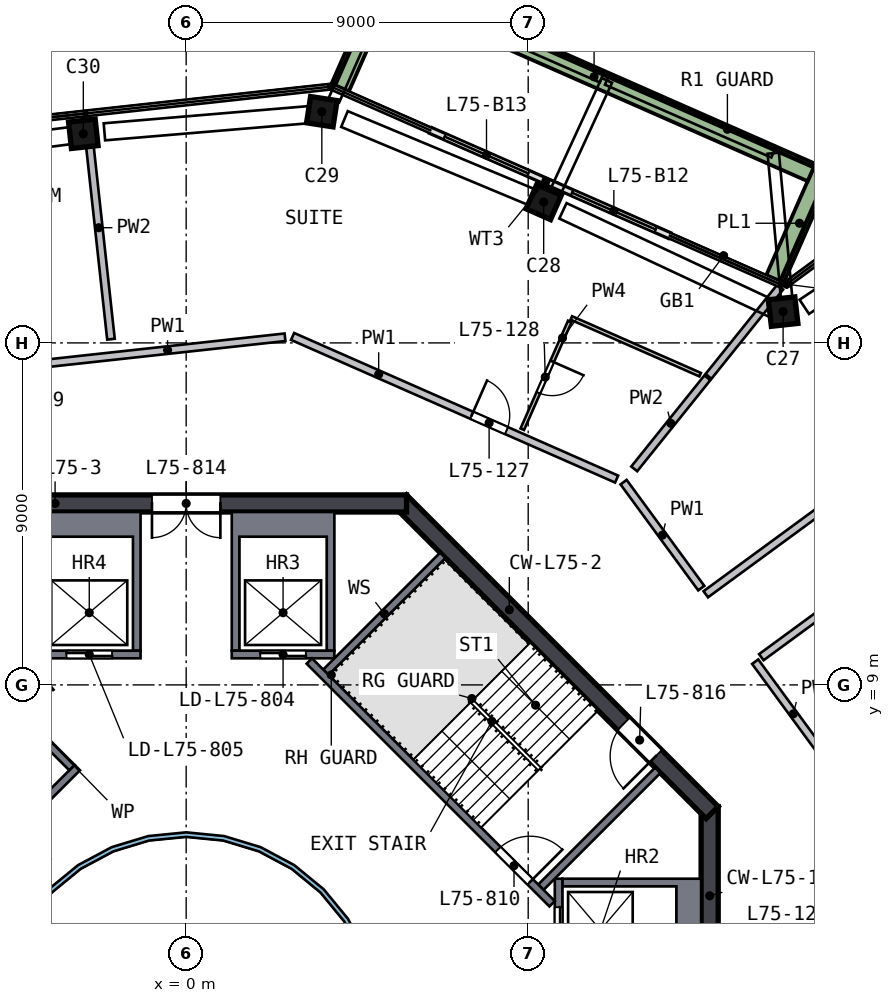
"""IFC4 building model, lengths in metres.
Left out: names, types, materials, properties, quantities, classifications, styles, units other than length and angle.
Written with IfcOpenShell. Run it as: python <this file> out.ifc"""

import sys

from ifc_helpers import new_model, si_unit, direction, frame, frame_2d, origin, origin_2d, place, context, subcontext, project, spatial, polyline, rectangle, outline, extrude, element, fill, save


model = new_model("IFC4")
c1 = context("Model", 3, precision=1e-05, world=origin(), true_north=direction((0.0, 1.0)))
c2 = subcontext(c1, "Body", "Model", "MODEL_VIEW")
j1 = project(units=[si_unit("LENGTHUNIT", "METRE"), si_unit("PLANEANGLEUNIT", "RADIAN")], contexts=[c1])
p1 = place(None, origin())
s1 = spatial("IfcSite", under=j1, at=p1, CompositionType="ELEMENT")
p2 = place(p1, origin())
s2 = spatial("IfcBuilding", under=s1, at=p2, CompositionType="ELEMENT")
p3 = place(p2, frame((0.0, 0.0, 303.0)))
s3 = spatial("IfcBuildingStorey", under=s2, at=p3, CompositionType="ELEMENT", Elevation=303.0)
p4 = place(p3, frame((15.816, 18.734, 0.0), z_axis=(-0.089770684, 0.074416173, 0.993178462), x_axis=(0.989989949, 0.115711882, 0.080812506)))
e1 = element("IfcColumn", 1, at=p4, inside=s3, PredefinedType="COLUMN", context=c2, shape_type="SweptSolid", body=[
    extrude(rectangle(XDim=0.7, YDim=0.7, at=origin_2d()), origin(), (0.0, 0.0, 1.0), 3.212),
])
p5 = place(p3, frame((9.532, 21.653, 0.0), z_axis=(-0.103349904, 0.044488369, 0.993649628), x_axis=(-0.909315502, 0.400606791, -0.112514522)))
e2 = element("IfcColumn", 2, at=p5, inside=s3, PredefinedType="COLUMN", context=c2, shape_type="SweptSolid", body=[
    extrude(rectangle(XDim=0.7, YDim=0.7, at=origin_2d()), origin(), (0.0, 0.0, 1.0), 3.21),
])
p6 = place(p3, frame((3.708, 24.064, 0.0), z_axis=(-0.114562055, 0.016648368, 0.993276582), x_axis=(0.981703846, -0.151184916, 0.115761304)))
e3 = element("IfcColumn", 3, at=p6, inside=s3, PredefinedType="COLUMN", context=c2, shape_type="SweptSolid", body=[
    extrude(rectangle(XDim=0.7, YDim=0.7, at=origin_2d()), origin(), (0.0, 0.0, 1.0), 3.211),
])
p7 = place(p3, frame((-2.572, 23.518, 0.0), z_axis=(-0.111790618, -0.013232359, 0.99364368), x_axis=(-0.987711126, -0.108422299, -0.112567032)))
e4 = element("IfcColumn", 4, at=p7, inside=s3, PredefinedType="COLUMN", context=c2, shape_type="SweptSolid", body=[
    extrude(rectangle(XDim=0.7, YDim=0.7, at=origin_2d()), origin(), (0.0, 0.0, 1.0), 3.21),
])
p8 = place(p3, frame((13.775, -5.799, 0.0), z_axis=(0.0, 0.0, 1.0), x_axis=(0.0, 1.0, 0.0)))
e5 = element("IfcWall", 5, at=p8, inside=s3, PredefinedType="SHEAR", context=c2, shape_type="SweptSolid", body=[
    extrude(rectangle(XDim=11.598, YDim=0.45, at=frame_2d((5.799, 0.0))), origin(), (0.0, 0.0, 1.0), 3.5),
])
p9 = place(p8, frame((4.899, 0.0, 0.0)))
e6 = element("IfcOpeningElement", 6, at=p9, cuts=e5, PredefinedType="OPENING", context=c2, shape_type="SweptSolid", body=[
    extrude(rectangle(XDim=1.8, YDim=2.1, at=frame_2d((0.9, 1.05))), frame((0.0, 0.235, 0.0), z_axis=(0.0, -1.0, 0.0), x_axis=(1.0, 0.0, 0.0)), (0.0, 0.0, 1.0), 0.47),
])
p10 = place(p3, frame((13.841, 5.64, 0.0), z_axis=(0.0, 0.0, 1.0), x_axis=(-0.707106781, 0.707106781, 0.0)))
e7 = element("IfcWall", 7, at=p10, inside=s3, PredefinedType="SHEAR", context=c2, shape_type="SweptSolid", body=[
    extrude(rectangle(XDim=11.598, YDim=0.45, at=frame_2d((5.799, 0.0))), origin(), (0.0, 0.0, 1.0), 3.5),
])
p11 = place(p10, frame((2.099, 0.0, 0.0)))
e8 = element("IfcOpeningElement", 8, at=p11, cuts=e7, PredefinedType="OPENING", context=c2, shape_type="SweptSolid", body=[
    extrude(rectangle(XDim=1.2, YDim=2.1, at=frame_2d((0.6, 1.05))), frame((0.0, 0.235, 0.0), z_axis=(0.0, -1.0, 0.0), x_axis=(1.0, 0.0, 0.0)), (0.0, 0.0, 1.0), 0.47),
])
p12 = place(p3, frame((5.799, 13.775, 0.0), z_axis=(0.0, 0.0, 1.0), x_axis=(-1.0, 0.0, 0.0)))
e9 = element("IfcWall", 9, at=p12, inside=s3, PredefinedType="SHEAR", context=c2, shape_type="SweptSolid", body=[
    extrude(rectangle(XDim=11.598, YDim=0.45, at=frame_2d((5.799, 0.0))), origin(), (0.0, 0.0, 1.0), 3.5),
])
p13 = place(p12, frame((4.899, 0.0, 0.0)))
e10 = element("IfcOpeningElement", 10, at=p13, cuts=e9, PredefinedType="OPENING", context=c2, shape_type="SweptSolid", body=[
    extrude(rectangle(XDim=1.8, YDim=2.1, at=frame_2d((0.9, 1.05))), frame((0.0, 0.235, 0.0), z_axis=(0.0, -1.0, 0.0), x_axis=(1.0, 0.0, 0.0)), (0.0, 0.0, 1.0), 0.47),
])
p14 = place(p3, frame((12.718, 20.824, 0.0), z_axis=(0.0, 0.0, 1.0), x_axis=(-0.915258533, 0.402866999, 0.0)))
e11 = element("IfcWall", 11, at=p14, inside=s3, PredefinedType="SOLIDWALL", context=c2, shape_type="SweptSolid", body=[
    extrude(rectangle(XDim=3.25, YDim=0.15, at=frame_2d((1.625, 0.0))), origin(), (0.0, 0.0, 1.0), 2.525),
])
p15 = place(p14, frame((0.4, 0.0, 0.0)))
e12 = element("IfcOpeningElement", 12, at=p15, cuts=e11, PredefinedType="OPENING", context=c2, shape_type="SweptSolid", body=[
    extrude(rectangle(XDim=2.4, YDim=2.4, at=frame_2d((1.2, 1.2))), frame((0.0, 0.085, 0.0), z_axis=(0.0, -1.0, 0.0), x_axis=(1.0, 0.0, 0.0)), (0.0, 0.0, 1.0), 0.17),
])
p16 = place(p3, frame((9.744, 22.134, 0.0), z_axis=(0.0, 0.0, 1.0), x_axis=(-0.915233272, 0.402924383, 0.0)))
e13 = element("IfcWall", 13, at=p16, inside=s3, PredefinedType="SOLIDWALL", context=c2, shape_type="SweptSolid", body=[
    extrude(rectangle(XDim=3.611, YDim=0.15, at=frame_2d((1.806, 0.0))), origin(), (0.0, 0.0, 1.0), 2.525),
])
p17 = place(p16, frame((0.811, 0.0, 0.0)))
e14 = element("IfcOpeningElement", 14, at=p17, cuts=e13, PredefinedType="OPENING", context=c2, shape_type="SweptSolid", body=[
    extrude(rectangle(XDim=2.4, YDim=2.4, at=frame_2d((1.2, 1.2))), frame((0.0, 0.085, 0.0), z_axis=(0.0, -1.0, 0.0), x_axis=(1.0, 0.0, 0.0)), (0.0, 0.0, 1.0), 0.17),
])
p18 = place(p3, frame((15.494, 19.685, 0.0), z_axis=(0.0, 0.0, 1.0), x_axis=(0.402963671, 0.915215974, 0.0)))
e15 = element("IfcWall", 15, at=p18, inside=s3, PredefinedType="SOLIDWALL", context=c2, shape_type="SweptSolid", body=[
    extrude(rectangle(XDim=3.199, YDim=0.5, at=frame_2d((1.6, 0.0))), origin(), (0.0, 0.0, 1.0), 0.7),
])
p19 = place(p3, frame((16.454, 22.485, 0.0), z_axis=(0.0, 0.0, 1.0), x_axis=(-0.915245899, 0.402895698, 0.0)))
e16 = element("IfcWall", 16, at=p19, inside=s3, PredefinedType="SOLIDWALL", context=c2, shape_type="SweptSolid", body=[
    extrude(rectangle(XDim=12.5, YDim=0.5, at=frame_2d((6.25, 0.0))), origin(), (0.0, 0.0, 1.0), 0.7),
])
p20 = place(p3, frame((5.141, 27.192, 0.0), z_axis=(0.0, 0.0, 1.0), x_axis=(-0.402862888, -0.915260342, 0.0)))
e17 = element("IfcWall", 17, at=p20, inside=s3, PredefinedType="SOLIDWALL", context=c2, shape_type="SweptSolid", body=[
    extrude(rectangle(XDim=2.699, YDim=0.5, at=frame_2d((1.35, 0.0))), origin(), (0.0, 0.0, 1.0), 0.7),
])
p21 = place(p3, origin())
e18 = element("IfcWall", 18, at=p21, inside=s3, PredefinedType="SOLIDWALL", context=c2, shape_type="SweptSolid", body=[
    extrude(outline(polyline([(13.55, 3.9), (13.55, 1.2), (9.9, 1.2), (9.9, 1.4), (12.9, 1.4), (12.9, 3.7), (9.9, 3.7), (9.9, 3.9), (13.55, 3.9)])), origin(), (0.0, 0.0, 1.0), 3.19),
])
p22 = place(p3, frame((9.8, 1.2, 0.0), z_axis=(0.0, 0.0, 1.0), x_axis=(0.0, 1.0, 0.0)))
e19 = element("IfcWall", 19, at=p22, inside=s3, PredefinedType="SOLIDWALL", context=c2, shape_type="SweptSolid", body=[
    extrude(rectangle(XDim=2.7, YDim=0.2, at=frame_2d((1.35, 0.0))), origin(), (0.0, 0.0, 1.0), 3.19),
])
p23 = place(p22, frame((0.75, 0.0, 0.0)))
e20 = element("IfcOpeningElement", 20, at=p23, cuts=e19, PredefinedType="OPENING", context=c2, shape_type="SweptSolid", body=[
    extrude(rectangle(XDim=1.2, YDim=2.1, at=frame_2d((0.6, 1.05))), frame((0.0, 0.11, 0.0), z_axis=(0.0, -1.0, 0.0), x_axis=(1.0, 0.0, 0.0)), (0.0, 0.0, 1.0), 0.22),
])
p24 = place(p3, origin())
e21 = element("IfcWall", 21, at=p24, inside=s3, PredefinedType="SOLIDWALL", context=c2, shape_type="SweptSolid", body=[
    extrude(outline(polyline([(3.9, 9.9), (3.7, 9.9), (3.7, 12.9), (1.4, 12.9), (1.4, 9.9), (1.2, 9.9), (1.2, 13.55), (3.9, 13.55), (3.9, 9.9)])), origin(), (0.0, 0.0, 1.0), 3.19),
])
p25 = place(p3, frame((1.2, 9.8, 0.0), z_axis=(0.0, 0.0, 1.0), x_axis=(1.0, 0.0, 0.0)))
e22 = element("IfcWall", 22, at=p25, inside=s3, PredefinedType="SOLIDWALL", context=c2, shape_type="SweptSolid", body=[
    extrude(rectangle(XDim=2.7, YDim=0.2, at=frame_2d((1.35, 0.0))), origin(), (0.0, 0.0, 1.0), 3.19),
])
p26 = place(p25, frame((0.75, 0.0, 0.0)))
e23 = element("IfcOpeningElement", 23, at=p26, cuts=e22, PredefinedType="OPENING", context=c2, shape_type="SweptSolid", body=[
    extrude(rectangle(XDim=1.2, YDim=2.1, at=frame_2d((0.6, 1.05))), frame((0.0, 0.11, 0.0), z_axis=(0.0, -1.0, 0.0), x_axis=(1.0, 0.0, 0.0)), (0.0, 0.0, 1.0), 0.22),
])
p27 = place(p3, origin())
e24 = element("IfcWall", 24, at=p27, inside=s3, PredefinedType="SOLIDWALL", context=c2, shape_type="SweptSolid", body=[
    extrude(outline(polyline([(-3.9, 13.55), (-1.2, 13.55), (-1.2, 9.9), (-1.4, 9.9), (-1.4, 12.9), (-3.7, 12.9), (-3.7, 9.9), (-3.9, 9.9), (-3.9, 13.55)])), origin(), (0.0, 0.0, 1.0), 3.19),
])
p28 = place(p3, frame((-1.2, 9.8, 0.0), z_axis=(0.0, 0.0, 1.0), x_axis=(-1.0, 0.0, 0.0)))
e25 = element("IfcWall", 25, at=p28, inside=s3, PredefinedType="SOLIDWALL", context=c2, shape_type="SweptSolid", body=[
    extrude(rectangle(XDim=2.7, YDim=0.2, at=frame_2d((1.35, 0.0))), origin(), (0.0, 0.0, 1.0), 3.19),
])
p29 = place(p28, frame((0.75, 0.0, 0.0)))
e26 = element("IfcOpeningElement", 26, at=p29, cuts=e25, PredefinedType="OPENING", context=c2, shape_type="SweptSolid", body=[
    extrude(rectangle(XDim=1.2, YDim=2.1, at=frame_2d((0.6, 1.05))), frame((0.0, 0.11, 0.0), z_axis=(0.0, -1.0, 0.0), x_axis=(1.0, 0.0, 0.0)), (0.0, 0.0, 1.0), 0.22),
])
p30 = place(p3, frame((3.24, 9.629, 0.0), z_axis=(0.0, 0.0, 1.0), x_axis=(0.707106781, -0.707106781, 0.0)))
e27 = element("IfcWall", 27, at=p30, inside=s3, PredefinedType="SOLIDWALL", context=c2, shape_type="SweptSolid", body=[
    extrude(rectangle(XDim=9.036, YDim=0.2, at=frame_2d((4.518, 0.0))), origin(), (0.0, 0.0, 1.0), 3.19),
])
p31 = place(p30, frame((7.018, 0.0, 0.0)))
e28 = element("IfcOpeningElement", 28, at=p31, cuts=e27, PredefinedType="OPENING", context=c2, shape_type="SweptSolid", body=[
    extrude(rectangle(XDim=1.2, YDim=2.1, at=frame_2d((0.6, 1.05))), frame((0.0, 0.11, 0.0), z_axis=(0.0, -1.0, 0.0), x_axis=(1.0, 0.0, 0.0)), (0.0, 0.0, 1.0), 0.22),
])
for number, where, z_axis, x_axis in (
    (29, (9.334, 3.677, 0.0), (0.0, 0.0, 1.0), (0.707, 0.707, 0.0)),
    (30, (3.677, 9.334, 0.0), (0.0, 0.0, 1.0), (0.707, 0.707, 0.0)),
):
    element("IfcWall", number, at=place(p3, frame(where, z_axis=z_axis, x_axis=x_axis)), inside=s3, PredefinedType="SOLIDWALL", context=c2, shape_type="SweptSolid", body=[
        extrude(rectangle(XDim=4.35, YDim=0.2, at=frame_2d((2.175, 0.0))), origin(), (0.0, 0.0, 1.0), 3.19),
    ])
p32 = place(p3, frame((-2.864, 6.823, 0.0), z_axis=(0.0, 0.0, 1.0), x_axis=(-0.707106781, -0.707106781, 0.0)))
e31 = element("IfcWall", 31, at=p32, inside=s3, PredefinedType="SOLIDWALL", context=c2, shape_type="SweptSolid", body=[
    extrude(rectangle(XDim=5.6, YDim=0.2, at=frame_2d((2.8, 0.0))), origin(), (0.0, 0.0, 1.0), 3.19),
])
p33 = place(p32, frame((2.2, 0.0, 0.0)))
e32 = element("IfcOpeningElement", 32, at=p33, cuts=e31, PredefinedType="OPENING", context=c2, shape_type="SweptSolid", body=[
    extrude(rectangle(XDim=1.2, YDim=2.1, at=frame_2d((0.6, 1.05))), frame((0.0, 0.11, 0.0), z_axis=(0.0, -1.0, 0.0), x_axis=(1.0, 0.0, 0.0)), (0.0, 0.0, 1.0), 0.22),
])
p34 = place(p3, frame((-3.005, 6.823, 0.0), z_axis=(0.0, 0.0, 1.0), x_axis=(-0.707106781, 0.707106781, 0.0)))
e33 = element("IfcWall", 33, at=p34, inside=s3, PredefinedType="SOLIDWALL", context=c2, shape_type="SweptSolid", body=[
    extrude(rectangle(XDim=2.8, YDim=0.2, at=frame_2d((1.4, 0.0))), origin(), (0.0, 0.0, 1.0), 3.19),
])
p35 = place(p3, origin())
e34 = element("IfcWall", 34, at=p35, inside=s3, PredefinedType="SOLIDWALL", context=c2, shape_type="SweptSolid", body=[
    extrude(outline(polyline([(5.021, -0.999), (4.73, -1.959), (4.257, -2.844), (3.62, -3.62), (2.844, -4.257), (1.959, -4.73), (0.999, -5.021), (0.0, -5.12), (-0.999, -5.021), (-1.959, -4.73), (-2.844, -4.257), (-3.62, -3.62), (-4.257, -2.844), (-4.73, -1.959), (-5.021, -0.999), (-5.12, 0.0), (-5.021, 0.999), (-4.73, 1.959), (-4.257, 2.844), (-3.62, 3.62), (-2.844, 4.257), (-1.959, 4.73), (-0.999, 5.021), (0.0, 5.12), (0.999, 5.021), (1.959, 4.73), (2.844, 4.257), (3.62, 3.62), (4.257, 2.844), (4.73, 1.959), (5.021, 0.999), (5.12, 0.0), (5.021, -0.999)]), holes=[polyline([(4.904, 0.976), (4.619, 1.913), (4.157, 2.778), (3.535, 3.535), (2.778, 4.157), (1.913, 4.619), (0.976, 4.904), (0.0, 5.0), (-0.976, 4.904), (-1.913, 4.619), (-2.778, 4.157), (-3.535, 3.535), (-4.157, 2.778), (-4.619, 1.913), (-4.904, 0.976), (-5.0, 0.0), (-4.904, -0.976), (-4.619, -1.913), (-4.157, -2.778), (-3.535, -3.535), (-2.778, -4.157), (-1.913, -4.619), (-0.976, -4.904), (0.0, -5.0), (0.976, -4.904), (1.913, -4.619), (2.778, -4.157), (3.535, -3.535), (4.157, -2.778), (4.619, -1.913), (4.904, -0.976), (5.0, 0.0), (4.904, 0.976)])]), origin(), (0.0, 0.0, 1.0), 3.19),
])
p36 = place(p3, frame((-6.66, 17.136, 0.0), z_axis=(0.0, 0.0, 1.0), x_axis=(0.994077134, 0.108676822, 0.0)))
e35 = element("IfcWall", 35, at=p36, inside=s3, PredefinedType="SOLIDWALL", context=c2, shape_type="SweptSolid", body=[
    extrude(rectangle(XDim=9.316, YDim=0.2, at=frame_2d((4.658, 0.0))), origin(), (0.0, 0.0, 1.0), 3.19),
])
p37 = place(p36, frame((1.9, 0.0, 0.0)))
e36 = element("IfcOpeningElement", 36, at=p37, cuts=e35, PredefinedType="OPENING", context=c2, shape_type="SweptSolid", body=[
    extrude(rectangle(XDim=1.0, YDim=2.1, at=frame_2d((0.5, 1.05))), frame((0.0, 0.11, 0.0), z_axis=(0.0, -1.0, 0.0), x_axis=(1.0, 0.0, 0.0)), (0.0, 0.0, 1.0), 0.22),
])
p38 = place(p3, frame((2.8, 18.17, 0.0), z_axis=(0.0, 0.0, 1.0), x_axis=(0.915237733, -0.402914249, 0.0)))
e37 = element("IfcWall", 37, at=p38, inside=s3, PredefinedType="SOLIDWALL", context=c2, shape_type="SweptSolid", body=[
    extrude(rectangle(XDim=9.316, YDim=0.2, at=frame_2d((4.658, 0.0))), origin(), (0.0, 0.0, 1.0), 3.19),
])
p39 = place(p38, frame((5.15, 0.0, 0.0)))
e38 = element("IfcOpeningElement", 38, at=p39, cuts=e37, PredefinedType="OPENING", context=c2, shape_type="SweptSolid", body=[
    extrude(rectangle(XDim=1.0, YDim=2.1, at=frame_2d((0.5, 1.05))), frame((0.0, 0.11, 0.0), z_axis=(0.0, -1.0, 0.0), x_axis=(1.0, 0.0, 0.0)), (0.0, 0.0, 1.0), 0.22),
])
p40 = place(p3, frame((13.554, 11.547, 0.0), z_axis=(0.0, 0.0, 1.0), x_axis=(-0.591164714, 0.806550855, 0.0)))
e39 = element("IfcWall", 39, at=p40, inside=s3, PredefinedType="SOLIDWALL", context=c2, shape_type="SweptSolid", body=[
    extrude(rectangle(XDim=3.458, YDim=0.2, at=frame_2d((1.729, 0.0))), origin(), (0.0, 0.0, 1.0), 3.19),
])
p41 = place(p3, frame((16.983, 6.869, 0.0), z_axis=(0.0, 0.0, 1.0), x_axis=(-0.59115197, 0.806560195, 0.0)))
e40 = element("IfcWall", 40, at=p41, inside=s3, PredefinedType="SOLIDWALL", context=c2, shape_type="SweptSolid", body=[
    extrude(rectangle(XDim=3.4, YDim=0.2, at=frame_2d((1.7, 0.0))), origin(), (0.0, 0.0, 1.0), 3.19),
])
p42 = place(p3, frame((13.673, 11.385, 0.0), z_axis=(0.0, 0.0, 1.0), x_axis=(0.806549823, 0.591166122, 0.0)))
e41 = element("IfcWall", 41, at=p42, inside=s3, PredefinedType="SOLIDWALL", context=c2, shape_type="SweptSolid", body=[
    extrude(rectangle(XDim=19.665, YDim=0.2, at=frame_2d((9.833, 0.0))), origin(), (0.0, 0.0, 1.0), 3.19),
])
p43 = place(p42, frame((15.05, 0.0, 0.0)))
e42 = element("IfcOpeningElement", 42, at=p43, cuts=e41, PredefinedType="OPENING", context=c2, shape_type="SweptSolid", body=[
    extrude(rectangle(XDim=1.0, YDim=2.1, at=frame_2d((0.5, 1.05))), frame((0.0, 0.11, 0.0), z_axis=(0.0, -1.0, 0.0), x_axis=(1.0, 0.0, 0.0)), (0.0, 0.0, 1.0), 0.22),
])
p44 = place(p3, frame((30.834, 21.237, 0.0), z_axis=(0.0, 0.0, 1.0), x_axis=(-0.806546926, -0.591170074, 0.0)))
e43 = element("IfcWall", 43, at=p44, inside=s3, PredefinedType="SOLIDWALL", context=c2, shape_type="SweptSolid", body=[
    extrude(rectangle(XDim=19.465, YDim=0.2, at=frame_2d((9.733, 0.0))), origin(), (0.0, 0.0, 1.0), 3.19),
])
p45 = place(p44, frame((2.1, 0.0, 0.0)))
e44 = element("IfcOpeningElement", 44, at=p45, cuts=e43, PredefinedType="OPENING", context=c2, shape_type="SweptSolid", body=[
    extrude(rectangle(XDim=1.0, YDim=2.1, at=frame_2d((0.5, 1.05))), frame((0.0, 0.11, 0.0), z_axis=(0.0, -1.0, 0.0), x_axis=(1.0, 0.0, 0.0)), (0.0, 0.0, 1.0), 0.22),
])
p46 = place(p3, frame((-1.979, 18.098, 0.0), z_axis=(0.0, 0.0, 1.0), x_axis=(-0.108697214, 0.994074904, 0.0)))
e45 = element("IfcWall", 45, at=p46, inside=s3, PredefinedType="SOLIDWALL", context=c2, shape_type="SweptSolid", body=[
    extrude(rectangle(XDim=5.903, YDim=0.2, at=frame_2d((2.951, 0.0))), origin(), (0.0, 0.0, 1.0), 3.19),
])
p47 = place(p3, frame((11.79, 14.685, 0.0), z_axis=(0.0, 0.0, 1.0), x_axis=(0.626049846, 0.77978304, 0.0)))
e46 = element("IfcWall", 46, at=p47, inside=s3, PredefinedType="SOLIDWALL", context=c2, shape_type="SweptSolid", body=[
    extrude(rectangle(XDim=3.074, YDim=0.2, at=frame_2d((1.537, 0.0))), origin(), (0.0, 0.0, 1.0), 3.19),
])
p48 = place(p3, frame((13.744, 17.118, 0.0), z_axis=(0.0, 0.0, 1.0), x_axis=(0.626058521, 0.779776076, 0.0)))
e47 = element("IfcWall", 47, at=p48, inside=s3, PredefinedType="SOLIDWALL", context=c2, shape_type="SweptSolid", body=[
    extrude(rectangle(XDim=3.011, YDim=0.2, at=frame_2d((1.506, 0.0))), origin(), (0.0, 0.0, 1.0), 3.19),
])
p49 = place(p3, frame((10.094, 18.565, 0.0), z_axis=(0.0, 0.0, 1.0), x_axis=(-0.402920719, -0.915234885, 0.0)))
e48 = element("IfcWall", 48, at=p49, inside=s3, PredefinedType="PARTITIONING", context=c2, shape_type="SweptSolid", body=[
    extrude(rectangle(XDim=3.1, YDim=0.1, at=frame_2d((1.55, 0.0))), origin(), (0.0, 0.0, 1.0), 3.19),
])
p50 = place(p49, frame((1.15, 0.0, 0.0)))
e49 = element("IfcOpeningElement", 49, at=p50, cuts=e48, PredefinedType="OPENING", context=c2, shape_type="SweptSolid", body=[
    extrude(rectangle(XDim=0.9, YDim=2.1, at=frame_2d((0.45, 1.05))), frame((0.0, 0.06, 0.0), z_axis=(0.0, -1.0, 0.0), x_axis=(1.0, 0.0, 0.0)), (0.0, 0.0, 1.0), 0.12),
])
p51 = place(p3, frame((10.134, 18.656, 0.0), z_axis=(0.0, 0.0, 1.0), x_axis=(0.915262542, -0.40285789, 0.0)))
e50 = element("IfcWall", 50, at=p51, inside=s3, PredefinedType="PARTITIONING", context=c2, shape_type="SweptSolid", body=[
    extrude(rectangle(XDim=3.704, YDim=0.1, at=frame_2d((1.852, 0.0))), origin(), (0.0, 0.0, 1.0), 3.19),
])
p52 = place(p15, origin())
e51 = element("IfcDoor", 51, at=p52, inside=s3, OperationType="SLIDING_TO_RIGHT", PredefinedType="DOOR", context=c2, shape_type="SweptSolid", body=[
    extrude(rectangle(XDim=2.4, YDim=2.4, at=frame_2d((1.2, 1.2))), frame((0.0, 0.025, 0.0), z_axis=(0.0, -1.0, 0.0), x_axis=(1.0, 0.0, 0.0)), (0.0, 0.0, 1.0), 0.05),
])
fill(e12, e51)
p53 = place(p17, origin())
e52 = element("IfcDoor", 52, at=p53, inside=s3, OperationType="SLIDING_TO_LEFT", PredefinedType="DOOR", context=c2, shape_type="SweptSolid", body=[
    extrude(rectangle(XDim=2.4, YDim=2.4, at=frame_2d((1.2, 1.2))), frame((0.0, 0.025, 0.0), z_axis=(0.0, -1.0, 0.0), x_axis=(1.0, 0.0, 0.0)), (0.0, 0.0, 1.0), 0.05),
])
fill(e14, e52)
p54 = place(p23, origin())
e53 = element("IfcDoor", 53, at=p54, inside=s3, OperationType="DOUBLE_DOOR_SLIDING", PredefinedType="DOOR", context=c2, shape_type="SweptSolid", body=[
    extrude(rectangle(XDim=1.2, YDim=2.1, at=frame_2d((0.6, 1.05))), frame((0.0, 0.025, 0.0), z_axis=(0.0, -1.0, 0.0), x_axis=(1.0, 0.0, 0.0)), (0.0, 0.0, 1.0), 0.05),
])
fill(e20, e53)
p55 = place(p26, origin())
e54 = element("IfcDoor", 54, at=p55, inside=s3, OperationType="DOUBLE_DOOR_SLIDING", PredefinedType="DOOR", context=c2, shape_type="SweptSolid", body=[
    extrude(rectangle(XDim=1.2, YDim=2.1, at=frame_2d((0.6, 1.05))), frame((0.0, 0.025, 0.0), z_axis=(0.0, -1.0, 0.0), x_axis=(1.0, 0.0, 0.0)), (0.0, 0.0, 1.0), 0.05),
])
fill(e23, e54)
p56 = place(p29, origin())
e55 = element("IfcDoor", 55, at=p56, inside=s3, OperationType="DOUBLE_DOOR_SLIDING", PredefinedType="DOOR", context=c2, shape_type="SweptSolid", body=[
    extrude(rectangle(XDim=1.2, YDim=2.1, at=frame_2d((0.6, 1.05))), frame((0.0, 0.025, 0.0), z_axis=(0.0, -1.0, 0.0), x_axis=(1.0, 0.0, 0.0)), (0.0, 0.0, 1.0), 0.05),
])
fill(e26, e55)
p57 = place(p31, origin())
e56 = element("IfcDoor", 56, at=p57, inside=s3, OperationType="SINGLE_SWING_RIGHT", PredefinedType="DOOR", context=c2, shape_type="SweptSolid", body=[
    extrude(rectangle(XDim=1.2, YDim=2.1, at=frame_2d((0.6, 1.05))), frame((0.0, 0.025, 0.0), z_axis=(0.0, -1.0, 0.0), x_axis=(1.0, 0.0, 0.0)), (0.0, 0.0, 1.0), 0.05),
])
fill(e28, e56)
p58 = place(p13, origin())
e57 = element("IfcDoor", 57, at=p58, inside=s3, OperationType="DOUBLE_DOOR_SINGLE_SWING", PredefinedType="DOOR", context=c2, shape_type="SweptSolid", body=[
    extrude(rectangle(XDim=1.8, YDim=2.1, at=frame_2d((0.9, 1.05))), frame((0.0, 0.025, 0.0), z_axis=(0.0, -1.0, 0.0), x_axis=(1.0, 0.0, 0.0)), (0.0, 0.0, 1.0), 0.05),
])
fill(e10, e57)
p59 = place(p11, origin())
e58 = element("IfcDoor", 58, at=p59, inside=s3, OperationType="SINGLE_SWING_LEFT", PredefinedType="DOOR", context=c2, shape_type="SweptSolid", body=[
    extrude(rectangle(XDim=1.2, YDim=2.1, at=frame_2d((0.6, 1.05))), frame((0.0, 0.025, 0.0), z_axis=(0.0, -1.0, 0.0), x_axis=(1.0, 0.0, 0.0)), (0.0, 0.0, 1.0), 0.05),
])
fill(e8, e58)
p60 = place(p39, origin())
e59 = element("IfcDoor", 59, at=p60, inside=s3, OperationType="SINGLE_SWING_LEFT", PredefinedType="DOOR", context=c2, shape_type="SweptSolid", body=[
    extrude(rectangle(XDim=1.0, YDim=2.1, at=frame_2d((0.5, 1.05))), frame((0.0, 0.025, 0.0), z_axis=(0.0, -1.0, 0.0), x_axis=(1.0, 0.0, 0.0)), (0.0, 0.0, 1.0), 0.05),
])
fill(e38, e59)
p61 = place(p50, origin())
e60 = element("IfcDoor", 60, at=p61, inside=s3, OperationType="SINGLE_SWING_LEFT", PredefinedType="DOOR", context=c2, shape_type="SweptSolid", body=[
    extrude(rectangle(XDim=0.9, YDim=2.1, at=frame_2d((0.45, 1.05))), frame((0.0, 0.025, 0.0), z_axis=(0.0, -1.0, 0.0), x_axis=(1.0, 0.0, 0.0)), (0.0, 0.0, 1.0), 0.05),
])
fill(e49, e60)
save(model, sys.argv[1])
